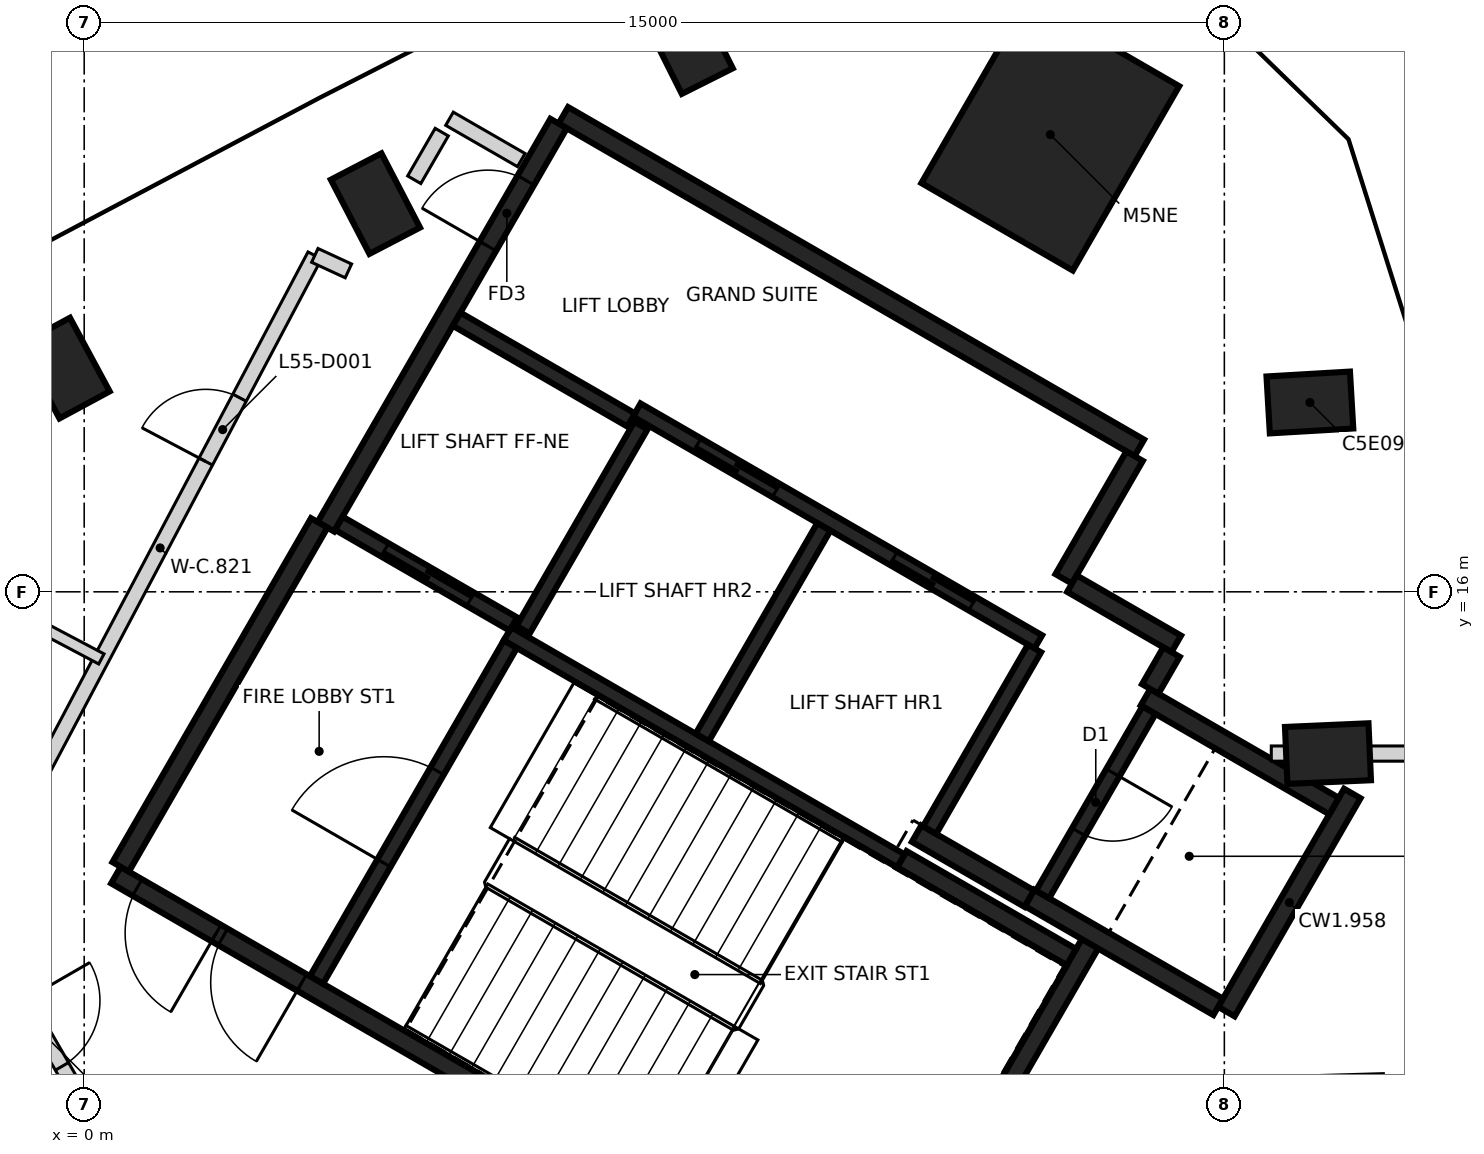
"""IFC4 building model, lengths in metres.
Left out: names, types, materials, properties, quantities, classifications, styles, units other than length and angle.
Written with IfcOpenShell. Run it as: python <this file> out.ifc"""

import sys

from ifc_helpers import new_model, si_unit, direction, frame, frame_2d, origin, origin_2d, place, context, subcontext, project, spatial, rectangle, extrude, element, fill, save


model = new_model("IFC4")
c1 = context("Model", 3, precision=1e-05, world=origin(), true_north=direction((0.0, 1.0)))
c2 = subcontext(c1, "Body", "Model", "MODEL_VIEW")
j1 = project(units=[si_unit("LENGTHUNIT", "METRE"), si_unit("PLANEANGLEUNIT", "RADIAN")], contexts=[c1])
p1 = place(None, origin())
s1 = spatial("IfcSite", under=j1, at=p1, CompositionType="ELEMENT")
p2 = place(p1, origin())
s2 = spatial("IfcBuilding", under=s1, at=p2, CompositionType="ELEMENT")
p3 = place(p2, frame((0.0, 0.0, 221.4)))
s3 = spatial("IfcBuildingStorey", under=s2, at=p3, CompositionType="ELEMENT", Elevation=221.4)
for number, where, z_axis, x_axis in (
    (1, (16.363, 13.872, -0.35), (0.0, 0.0, 1.0), (0.999, 0.044, 0.0)),
    (2, (16.125, 18.491, -0.35), (0.0, 0.0, 1.0), (0.998, 0.058, 0.0)),
    (3, (7.951, 23.211, -0.35), (0.0, 0.0, 1.0), (-0.449, 0.894, 0.0)),
    (4, (3.832, 21.107, -0.35), (0.0, 0.0, 1.0), (-0.461, 0.887, 0.0)),
    (5, (-0.256, 18.943, -0.35), (0.0, 0.0, 1.0), (-0.475, 0.88, 0.0)),
):
    element("IfcColumn", number, at=place(p3, frame(where, z_axis=z_axis, x_axis=x_axis)), inside=s3, PredefinedType="COLUMN", context=c2, shape_type="SweptSolid", body=[
        extrude(rectangle(XDim=1.1, YDim=0.75, at=origin_2d()), origin(), (0.0, 0.0, 1.0), 3.6),
    ])
p4 = place(p3, frame((12.71, 22.015, -0.35), z_axis=(0.0, 0.0, 1.0), x_axis=(0.5, 0.866025403784, 0.0)))
e6 = element("IfcColumn", 6, at=p4, inside=s3, PredefinedType="COLUMN", context=c2, shape_type="SweptSolid", body=[
    extrude(rectangle(XDim=2.8, YDim=2.3, at=origin_2d()), origin(), (0.0, 0.0, 1.0), 3.6),
])
p5 = place(p3, frame((10.42, 6.498, 0.0), z_axis=(0.0, 0.0, 1.0), x_axis=(-0.866021906294, 0.500006057782, 0.0)))
e7 = element("IfcWall", 7, at=p5, inside=s3, PredefinedType="SHEAR", context=c2, shape_type="SweptSolid", body=[
    extrude(rectangle(XDim=11.55, YDim=0.25, at=frame_2d((5.775, 0.0))), origin(), (0.0, 0.0, 1.0), 3.25),
])
p6 = place(p5, frame((10.025, 0.0, 0.0)))
e8 = element("IfcOpeningElement", 8, at=p6, cuts=e7, PredefinedType="OPENING", context=c2, shape_type="SweptSolid", body=[
    extrude(rectangle(XDim=1.2, YDim=2.1, at=frame_2d((0.6, 1.05))), frame((0.0, 0.135, 0.0), z_axis=(0.0, -1.0, 0.0), x_axis=(1.0, 0.0, 0.0)), (0.0, 0.0, 1.0), 0.27),
])
p7 = place(p5, frame((8.725, 0.0, 0.0)))
e9 = element("IfcOpeningElement", 9, at=p7, cuts=e7, PredefinedType="OPENING", context=c2, shape_type="SweptSolid", body=[
    extrude(rectangle(XDim=1.2, YDim=2.1, at=frame_2d((0.6, 1.05))), frame((0.0, 0.135, 0.0), z_axis=(0.0, -1.0, 0.0), x_axis=(1.0, 0.0, 0.0)), (0.0, 0.0, 1.0), 0.27),
])
p8 = place(p3, frame((6.304, 22.269, 0.0), z_axis=(0.0, 0.0, 1.0), x_axis=(0.866022959057, -0.500004234368, 0.0)))
e10 = element("IfcWall", 10, at=p8, inside=s3, PredefinedType="SHEAR", context=c2, shape_type="SweptSolid", body=[
    extrude(rectangle(XDim=8.75, YDim=0.25, at=frame_2d((4.375, 0.0))), origin(), (0.0, 0.0, 1.0), 3.25),
])
p9 = place(p3, frame((3.179, 16.856, 0.0), z_axis=(0.0, 0.0, 1.0), x_axis=(0.500001955336, 0.866024274868, 0.0)))
e11 = element("IfcWall", 11, at=p9, inside=s3, PredefinedType="SHEAR", context=c2, shape_type="SweptSolid", body=[
    extrude(rectangle(XDim=6.125, YDim=0.25, at=frame_2d((3.062, 0.0))), origin(), (0.0, 0.0, 1.0), 3.25),
])
p10 = place(p9, frame((4.263, 0.0, 0.0)))
e12 = element("IfcOpeningElement", 12, at=p10, cuts=e11, PredefinedType="OPENING", context=c2, shape_type="SweptSolid", body=[
    extrude(rectangle(XDim=1.0, YDim=2.1, at=frame_2d((0.5, 1.05))), frame((0.0, 0.135, 0.0), z_axis=(0.0, -1.0, 0.0), x_axis=(1.0, 0.0, 0.0)), (0.0, 0.0, 1.0), 0.27),
])
p11 = place(p3, frame((0.48, 12.381, 0.0), z_axis=(0.0, 0.0, 1.0), x_axis=(0.49999885962, 0.866026062182, 0.0)))
e13 = element("IfcWall", 13, at=p11, inside=s3, PredefinedType="SHEAR", context=c2, shape_type="SweptSolid", body=[
    extrude(rectangle(XDim=5.225, YDim=0.25, at=frame_2d((2.612, 0.0))), origin(), (0.0, 0.0, 1.0), 3.25),
])
p12 = place(p3, frame((13.238, 11.378, 0.0), z_axis=(0.0, 0.0, 1.0), x_axis=(-0.500008851346, -0.866020293397, 0.0)))
e14 = element("IfcWall", 14, at=p12, inside=s3, PredefinedType="SHEAR", context=c2, shape_type="SweptSolid", body=[
    extrude(rectangle(XDim=5.51, YDim=0.25, at=frame_2d((2.755, 0.0))), origin(), (0.0, 0.0, 1.0), 3.25),
])
p13 = place(p3, frame((16.684, 13.347, 0.0), z_axis=(0.0, 0.0, 1.0), x_axis=(-0.499998874531, -0.866026053573, 0.0)))
e15 = element("IfcWall", 15, at=p13, inside=s3, PredefinedType="SHEAR", context=c2, shape_type="SweptSolid", body=[
    extrude(rectangle(XDim=3.313, YDim=0.25, at=frame_2d((1.656, 0.0))), origin(), (0.0, 0.0, 1.0), 3.25),
])
p14 = place(p3, frame((14.918, 10.54, 0.0), z_axis=(0.0, 0.0, 1.0), x_axis=(-0.866063538972, 0.499933942099, 0.0)))
e16 = element("IfcWall", 16, at=p14, inside=s3, PredefinedType="SHEAR", context=c2, shape_type="SweptSolid", body=[
    extrude(rectangle(XDim=2.865, YDim=0.25, at=frame_2d((1.432, 0.0))), origin(), (0.0, 0.0, 1.0), 3.25),
])
p15 = place(p3, frame((13.963, 14.614, 0.0), z_axis=(0.0, 0.0, 1.0), x_axis=(0.866042235819, -0.499970844928, 0.0)))
e17 = element("IfcWall", 17, at=p15, inside=s3, PredefinedType="SHEAR", context=c2, shape_type="SweptSolid", body=[
    extrude(rectangle(XDim=2.865, YDim=0.25, at=frame_2d((1.432, 0.0))), origin(), (0.0, 0.0, 1.0), 3.25),
])
p16 = place(p3, frame((10.757, 12.481, 0.0), z_axis=(0.0, 0.0, 1.0), x_axis=(0.866022940537, -0.500004266446, 0.0)))
e18 = element("IfcWall", 18, at=p16, inside=s3, PredefinedType="SHEAR", context=c2, shape_type="SweptSolid", body=[
    extrude(rectangle(XDim=2.575, YDim=0.25, at=frame_2d((1.287, 0.0))), origin(), (0.0, 0.0, 1.0), 3.25),
])
p17 = place(p3, frame((13.819, 17.785, 0.0), z_axis=(0.0, 0.0, 1.0), x_axis=(-0.500039802285, -0.866002422705, 0.0)))
e19 = element("IfcWall", 19, at=p17, inside=s3, PredefinedType="SHEAR", context=c2, shape_type="SweptSolid", body=[
    extrude(rectangle(XDim=1.865, YDim=0.25, at=frame_2d((0.932, 0.0))), origin(), (0.0, 0.0, 1.0), 3.25),
])
p18 = place(p3, frame((12.433, 11.964, 0.0), z_axis=(0.0, 0.0, 1.0), x_axis=(-0.866038183914, 0.499977863513, 0.0)))
e20 = element("IfcWall", 20, at=p18, inside=s3, PredefinedType="SHEAR", context=c2, shape_type="SweptSolid", body=[
    extrude(rectangle(XDim=1.71, YDim=0.25, at=frame_2d((0.855, 0.0))), origin(), (0.0, 0.0, 1.0), 3.25),
])
p19 = place(p3, frame((12.995, 16.108, 0.0), z_axis=(0.0, 0.0, 1.0), x_axis=(0.866044474677, -0.49996696679, 0.0)))
e21 = element("IfcWall", 21, at=p19, inside=s3, PredefinedType="SHEAR", context=c2, shape_type="SweptSolid", body=[
    extrude(rectangle(XDim=1.584, YDim=0.25, at=frame_2d((0.792, 0.0))), origin(), (0.0, 0.0, 1.0), 3.25),
])
p20 = place(p3, frame((14.305, 15.207, 0.0), z_axis=(0.0, 0.0, 1.0), x_axis=(-0.499848422343, -0.866112899501, 0.0)))
e22 = element("IfcWall", 22, at=p20, inside=s3, PredefinedType="SHEAR", context=c2, shape_type="SweptSolid", body=[
    extrude(rectangle(XDim=0.559, YDim=0.25, at=frame_2d((0.28, 0.0))), origin(), (0.0, 0.0, 1.0), 3.25),
])
p21 = place(p3, frame((12.552, 15.342, 0.0), z_axis=(0.0, 0.0, 1.0), x_axis=(-0.866030299012, 0.499991521122, 0.0)))
e23 = element("IfcWall", 23, at=p21, inside=s3, PredefinedType="SHEAR", context=c2, shape_type="SweptSolid", body=[
    extrude(rectangle(XDim=6.1, YDim=0.2, at=frame_2d((3.05, 0.0))), origin(), (0.0, 0.0, 1.0), 3.25),
])
p22 = place(p21, frame((1.0, 0.0, 0.0)))
e24 = element("IfcOpeningElement", 24, at=p22, cuts=e23, PredefinedType="OPENING", context=c2, shape_type="SweptSolid", body=[
    extrude(rectangle(XDim=1.2, YDim=2.1, at=frame_2d((0.6, 1.05))), frame((0.0, 0.11, 0.0), z_axis=(0.0, -1.0, 0.0), x_axis=(1.0, 0.0, 0.0)), (0.0, 0.0, 1.0), 0.22),
])
p23 = place(p21, frame((3.982, 0.0, 0.0)))
e25 = element("IfcOpeningElement", 25, at=p23, cuts=e23, PredefinedType="OPENING", context=c2, shape_type="SweptSolid", body=[
    extrude(rectangle(XDim=1.2, YDim=2.1, at=frame_2d((0.6, 1.05))), frame((0.0, 0.11, 0.0), z_axis=(0.0, -1.0, 0.0), x_axis=(1.0, 0.0, 0.0)), (0.0, 0.0, 1.0), 0.22),
])
p24 = place(p3, frame((10.743, 12.46, 0.0), z_axis=(0.0, 0.0, 1.0), x_axis=(-0.866018848283, 0.500011354289, 0.0)))
e26 = element("IfcWall", 26, at=p24, inside=s3, PredefinedType="SHEAR", context=c2, shape_type="SweptSolid", body=[
    extrude(rectangle(XDim=5.974, YDim=0.2, at=frame_2d((2.987, 0.0))), origin(), (0.0, 0.0, 1.0), 3.25),
])
p25 = place(p3, frame((3.057, 10.895, 0.0), z_axis=(0.0, 0.0, 1.0), x_axis=(0.500027839223, 0.866009330205, 0.0)))
e27 = element("IfcWall", 27, at=p25, inside=s3, PredefinedType="SHEAR", context=c2, shape_type="SweptSolid", body=[
    extrude(rectangle(XDim=5.098, YDim=0.2, at=frame_2d((2.549, 0.0))), origin(), (0.0, 0.0, 1.0), 3.25),
])
p26 = place(p25, frame((1.774, 0.0, 0.0)))
e28 = element("IfcOpeningElement", 28, at=p26, cuts=e27, PredefinedType="OPENING", context=c2, shape_type="SweptSolid", body=[
    extrude(rectangle(XDim=1.4, YDim=2.1, at=frame_2d((0.7, 1.05))), frame((0.0, 0.11, 0.0), z_axis=(0.0, -1.0, 0.0), x_axis=(1.0, 0.0, 0.0)), (0.0, 0.0, 1.0), 0.22),
])
p27 = place(p3, frame((8.132, 14.084, 0.0), z_axis=(0.0, 0.0, 1.0), x_axis=(0.500030834389, 0.86600760081, 0.0)))
e29 = element("IfcWall", 29, at=p27, inside=s3, PredefinedType="SHEAR", context=c2, shape_type="SweptSolid", body=[
    extrude(rectangle(XDim=3.198, YDim=0.2, at=frame_2d((1.599, 0.0))), origin(), (0.0, 0.0, 1.0), 3.25),
])
p28 = place(p3, frame((14.008, 14.442, 0.0), z_axis=(0.0, 0.0, 1.0), x_axis=(-0.499986818241, -0.866033014143, 0.0)))
e30 = element("IfcWall", 30, at=p28, inside=s3, PredefinedType="SHEAR", context=c2, shape_type="SweptSolid", body=[
    extrude(rectangle(XDim=2.798, YDim=0.2, at=frame_2d((1.399, 0.0))), origin(), (0.0, 0.0, 1.0), 3.25),
])
p29 = place(p28, frame((0.949, 0.0, 0.0)))
e31 = element("IfcOpeningElement", 31, at=p29, cuts=e30, PredefinedType="OPENING", context=c2, shape_type="SweptSolid", body=[
    extrude(rectangle(XDim=0.9, YDim=2.1, at=frame_2d((0.45, 1.05))), frame((0.0, 0.11, 0.0), z_axis=(0.0, -1.0, 0.0), x_axis=(1.0, 0.0, 0.0)), (0.0, 0.0, 1.0), 0.22),
])
p30 = place(p3, frame((12.502, 15.255, 0.0), z_axis=(0.0, 0.0, 1.0), x_axis=(-0.499965018551, -0.866045599391, 0.0)))
e32 = element("IfcWall", 32, at=p30, inside=s3, PredefinedType="SHEAR", context=c2, shape_type="SweptSolid", body=[
    extrude(rectangle(XDim=2.759, YDim=0.2, at=frame_2d((1.379, 0.0))), origin(), (0.0, 0.0, 1.0), 3.25),
])
p31 = place(p3, frame((7.324, 18.187, 0.0), z_axis=(0.0, 0.0, 1.0), x_axis=(-0.499967891604, -0.866043940782, 0.0)))
e33 = element("IfcWall", 33, at=p31, inside=s3, PredefinedType="SHEAR", context=c2, shape_type="SweptSolid", body=[
    extrude(rectangle(XDim=3.1, YDim=0.2, at=frame_2d((1.55, 0.0))), origin(), (0.0, 0.0, 1.0), 3.25),
])
p32 = place(p3, frame((5.646, 15.576, 0.0), z_axis=(0.0, 0.0, 1.0), x_axis=(-0.866018407898, 0.500012117035, 0.0)))
e34 = element("IfcWall", 34, at=p32, inside=s3, PredefinedType="SHEAR", context=c2, shape_type="SweptSolid", body=[
    extrude(rectangle(XDim=2.651, YDim=0.2, at=frame_2d((1.325, 0.0))), origin(), (0.0, 0.0, 1.0), 3.25),
])
p33 = place(p32, frame((0.652, 0.0, 0.0)))
e35 = element("IfcOpeningElement", 35, at=p33, cuts=e34, PredefinedType="OPENING", context=c2, shape_type="SweptSolid", body=[
    extrude(rectangle(XDim=1.3, YDim=2.1, at=frame_2d((0.65, 1.05))), frame((0.0, 0.11, 0.0), z_axis=(0.0, -1.0, 0.0), x_axis=(1.0, 0.0, 0.0)), (0.0, 0.0, 1.0), 0.22),
])
p34 = place(p3, frame((7.196, 18.26, 0.0), z_axis=(0.0, 0.0, 1.0), x_axis=(-0.866018407898, 0.500012117035, 0.0)))
e36 = element("IfcWall", 36, at=p34, inside=s3, PredefinedType="SHEAR", context=c2, shape_type="SweptSolid", body=[
    extrude(rectangle(XDim=2.651, YDim=0.2, at=frame_2d((1.325, 0.0))), origin(), (0.0, 0.0, 1.0), 3.25),
])
p35 = place(p3, frame((-2.43, 13.459, 0.0), z_axis=(0.0, 0.0, 1.0), x_axis=(0.499957265187, -0.866050075334, 0.0)))
e37 = element("IfcWall", 37, at=p35, inside=s3, PredefinedType="PARTITIONING", context=c2, shape_type="SweptSolid", body=[
    extrude(rectangle(XDim=6.87, YDim=0.2, at=frame_2d((3.435, 0.0))), origin(), (0.0, 0.0, 1.0), 3.25),
])
p36 = place(p35, frame((3.275, 0.0, 0.0)))
e38 = element("IfcOpeningElement", 38, at=p36, cuts=e37, PredefinedType="OPENING", context=c2, shape_type="SweptSolid", body=[
    extrude(rectangle(XDim=1.0, YDim=2.1, at=frame_2d((0.5, 1.05))), frame((0.0, 0.11, 0.0), z_axis=(0.0, -1.0, 0.0), x_axis=(1.0, 0.0, 0.0)), (0.0, 0.0, 1.0), 0.22),
])
p37 = place(p3, frame((-1.035, 12.73, 0.0), z_axis=(0.0, 0.0, 1.0), x_axis=(0.46738248691, 0.884055208078, 0.0)))
e39 = element("IfcWall", 39, at=p37, inside=s3, PredefinedType="PARTITIONING", context=c2, shape_type="SweptSolid", body=[
    extrude(rectangle(XDim=8.705, YDim=0.2, at=frame_2d((4.352, 0.0))), origin(), (0.0, 0.0, 1.0), 3.25),
])
p38 = place(p37, frame((5.638, 0.0, 0.0)))
e40 = element("IfcOpeningElement", 40, at=p38, cuts=e39, PredefinedType="OPENING", context=c2, shape_type="SweptSolid", body=[
    extrude(rectangle(XDim=0.95, YDim=2.1, at=frame_2d((0.475, 1.05))), frame((0.0, 0.11, 0.0), z_axis=(0.0, -1.0, 0.0), x_axis=(1.0, 0.0, 0.0)), (0.0, 0.0, 1.0), 0.22),
])
p39 = place(p3, frame((3.034, 20.426, 0.0), z_axis=(0.0, 0.0, 1.0), x_axis=(0.907930035436, -0.41912176125, 0.0)))
e41 = element("IfcWall", 41, at=p39, inside=s3, PredefinedType="PARTITIONING", context=c2, shape_type="SweptSolid", body=[
    extrude(rectangle(XDim=0.487, YDim=0.2, at=frame_2d((0.244, 0.0))), origin(), (0.0, 0.0, 1.0), 3.25),
])
p40 = place(p3, frame((4.342, 21.421, 0.0), z_axis=(0.0, 0.0, 1.0), x_axis=(0.500238258503, 0.865887801468, 0.0)))
e42 = element("IfcWall", 42, at=p40, inside=s3, PredefinedType="PARTITIONING", context=c2, shape_type="SweptSolid", body=[
    extrude(rectangle(XDim=0.724, YDim=0.2, at=frame_2d((0.362, 0.0))), origin(), (0.0, 0.0, 1.0), 2.35),
])
p41 = place(p3, frame((4.806, 22.224, 0.0), z_axis=(0.0, 0.0, 1.0), x_axis=(0.866334698307, -0.499463903109, 0.0)))
e43 = element("IfcWall", 43, at=p41, inside=s3, PredefinedType="PARTITIONING", context=c2, shape_type="SweptSolid", body=[
    extrude(rectangle(XDim=1.09, YDim=0.2, at=frame_2d((0.545, 0.0))), origin(), (0.0, 0.0, 1.0), 2.35),
])
p42 = place(p3, frame((15.618, 13.872, 0.0), z_axis=(0.0, 0.0, 1.0), x_axis=(1.0, 0.0, 0.0)))
e44 = element("IfcWall", 44, at=p42, inside=s3, PredefinedType="PARTITIONING", context=c2, shape_type="SweptSolid", body=[
    extrude(rectangle(XDim=2.316, YDim=0.2, at=frame_2d((1.158, 0.0))), origin(), (0.0, 0.0, 1.0), 3.25),
])
p43 = place(p3, frame((-2.426, 16.519, 0.0), z_axis=(0.0, 0.0, 1.0), x_axis=(0.884056991815, -0.467379112952, 0.0)))
e45 = element("IfcWall", 45, at=p43, inside=s3, PredefinedType="PARTITIONING", context=c2, shape_type="SweptSolid", body=[
    extrude(rectangle(XDim=3.0, YDim=0.15, at=frame_2d((1.5, 0.0))), origin(), (0.0, 0.0, 1.0), 3.25),
])
p44 = place(p43, frame((1.1, 0.0, 0.0)))
e46 = element("IfcOpeningElement", 46, at=p44, cuts=e45, PredefinedType="OPENING", context=c2, shape_type="SweptSolid", body=[
    extrude(rectangle(XDim=0.8, YDim=2.1, at=frame_2d((0.4, 1.05))), frame((0.0, 0.085, 0.0), z_axis=(0.0, -1.0, 0.0), x_axis=(1.0, 0.0, 0.0)), (0.0, 0.0, 1.0), 0.17),
])
p45 = place(p3, frame((-2.131, 9.74, 0.0), z_axis=(0.0, 0.0, 1.0), x_axis=(0.500010275428, -0.866019471182, 0.0)))
e47 = element("IfcWall", 47, at=p45, inside=s3, PredefinedType="PARTITIONING", context=c2, shape_type="SweptSolid", body=[
    extrude(rectangle(XDim=3.5, YDim=0.15, at=frame_2d((1.75, 0.0))), origin(), (0.0, 0.0, 1.0), 3.25),
])
p46 = place(p45, frame((1.35, 0.0, 0.0)))
e48 = element("IfcOpeningElement", 48, at=p46, cuts=e47, PredefinedType="OPENING", context=c2, shape_type="SweptSolid", body=[
    extrude(rectangle(XDim=0.8, YDim=2.1, at=frame_2d((0.4, 1.05))), frame((0.0, 0.085, 0.0), z_axis=(0.0, -1.0, 0.0), x_axis=(1.0, 0.0, 0.0)), (0.0, 0.0, 1.0), 0.17),
])
p47 = place(p33, origin())
e49 = element("IfcDoor", 49, at=p47, inside=s3, OperationType="SLIDING_TO_LEFT", PredefinedType="DOOR", context=c2, shape_type="SweptSolid", body=[
    extrude(rectangle(XDim=1.3, YDim=2.1, at=frame_2d((0.65, 1.05))), frame((0.0, 0.025, 0.0), z_axis=(0.0, -1.0, 0.0), x_axis=(1.0, 0.0, 0.0)), (0.0, 0.0, 1.0), 0.05),
])
fill(e35, e49)
p48 = place(p22, origin())
e50 = element("IfcDoor", 50, at=p48, inside=s3, OperationType="DOUBLE_DOOR_SLIDING", PredefinedType="DOOR", context=c2, shape_type="SweptSolid", body=[
    extrude(rectangle(XDim=1.2, YDim=2.1, at=frame_2d((0.6, 1.05))), frame((0.0, 0.025, 0.0), z_axis=(0.0, -1.0, 0.0), x_axis=(1.0, 0.0, 0.0)), (0.0, 0.0, 1.0), 0.05),
])
fill(e24, e50)
p49 = place(p23, origin())
e51 = element("IfcDoor", 51, at=p49, inside=s3, OperationType="DOUBLE_DOOR_SLIDING", PredefinedType="DOOR", context=c2, shape_type="SweptSolid", body=[
    extrude(rectangle(XDim=1.2, YDim=2.1, at=frame_2d((0.6, 1.05))), frame((0.0, 0.025, 0.0), z_axis=(0.0, -1.0, 0.0), x_axis=(1.0, 0.0, 0.0)), (0.0, 0.0, 1.0), 0.05),
])
fill(e25, e51)
p50 = place(p10, origin())
e52 = element("IfcDoor", 52, at=p50, inside=s3, OperationType="SINGLE_SWING_LEFT", PredefinedType="DOOR", context=c2, shape_type="SweptSolid", body=[
    extrude(rectangle(XDim=1.0, YDim=2.1, at=frame_2d((0.5, 1.05))), frame((0.0, 0.025, 0.0), z_axis=(0.0, -1.0, 0.0), x_axis=(1.0, 0.0, 0.0)), (0.0, 0.0, 1.0), 0.05),
])
fill(e12, e52)
p51 = place(p6, origin())
e53 = element("IfcDoor", 53, at=p51, inside=s3, OperationType="SINGLE_SWING_LEFT", PredefinedType="DOOR", context=c2, shape_type="SweptSolid", body=[
    extrude(rectangle(XDim=1.2, YDim=2.1, at=frame_2d((0.6, 1.05))), frame((0.0, 0.025, 0.0), z_axis=(0.0, -1.0, 0.0), x_axis=(1.0, 0.0, 0.0)), (0.0, 0.0, 1.0), 0.05),
])
fill(e8, e53)
p52 = place(p7, origin())
e54 = element("IfcDoor", 54, at=p52, inside=s3, OperationType="SINGLE_SWING_RIGHT", PredefinedType="DOOR", context=c2, shape_type="SweptSolid", body=[
    extrude(rectangle(XDim=1.2, YDim=2.1, at=frame_2d((0.6, 1.05))), frame((0.0, 0.025, 0.0), z_axis=(0.0, -1.0, 0.0), x_axis=(1.0, 0.0, 0.0)), (0.0, 0.0, 1.0), 0.05),
])
fill(e9, e54)
p53 = place(p26, origin())
e55 = element("IfcDoor", 55, at=p53, inside=s3, OperationType="SINGLE_SWING_LEFT", PredefinedType="DOOR", context=c2, shape_type="SweptSolid", body=[
    extrude(rectangle(XDim=1.4, YDim=2.1, at=frame_2d((0.7, 1.05))), frame((0.0, 0.025, 0.0), z_axis=(0.0, -1.0, 0.0), x_axis=(1.0, 0.0, 0.0)), (0.0, 0.0, 1.0), 0.05),
])
fill(e28, e55)
p54 = place(p29, origin())
e56 = element("IfcDoor", 56, at=p54, inside=s3, OperationType="SINGLE_SWING_RIGHT", PredefinedType="DOOR", context=c2, shape_type="SweptSolid", body=[
    extrude(rectangle(XDim=0.9, YDim=2.1, at=frame_2d((0.45, 1.05))), frame((0.0, 0.025, 0.0), z_axis=(0.0, -1.0, 0.0), x_axis=(1.0, 0.0, 0.0)), (0.0, 0.0, 1.0), 0.05),
])
fill(e31, e56)
p55 = place(p38, frame((0.95, 0.0, 0.0), z_axis=(0.0, 0.0, 1.0), x_axis=(-1.0, 0.0, 0.0)))
e57 = element("IfcDoor", 57, at=p55, inside=s3, OperationType="SINGLE_SWING_LEFT", PredefinedType="DOOR", context=c2, shape_type="SweptSolid", body=[
    extrude(rectangle(XDim=0.95, YDim=2.1, at=frame_2d((0.475, 1.05))), frame((0.0, 0.025, 0.0), z_axis=(0.0, -1.0, 0.0), x_axis=(1.0, 0.0, 0.0)), (0.0, 0.0, 1.0), 0.05),
])
fill(e40, e57)
p56 = place(p36, frame((1.0, 0.0, 0.0), z_axis=(0.0, 0.0, 1.0), x_axis=(-1.0, 0.0, 0.0)))
e58 = element("IfcDoor", 58, at=p56, inside=s3, OperationType="SINGLE_SWING_LEFT", PredefinedType="DOOR", context=c2, shape_type="SweptSolid", body=[
    extrude(rectangle(XDim=1.0, YDim=2.1, at=frame_2d((0.5, 1.05))), frame((0.0, 0.025, 0.0), z_axis=(0.0, -1.0, 0.0), x_axis=(1.0, 0.0, 0.0)), (0.0, 0.0, 1.0), 0.05),
])
fill(e38, e58)
save(model, sys.argv[1])
